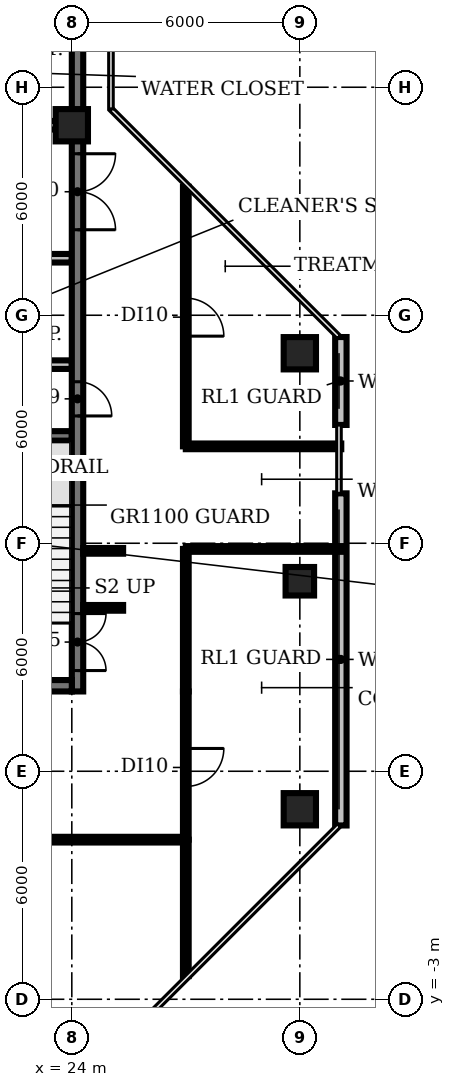
"""IFC4 building model, lengths in metres.
Left out: names, types, materials, properties, quantities, classifications, styles, units other than length and angle.
Written with IfcOpenShell. Run it as: python <this file> out.ifc"""

import sys

from ifc_helpers import new_model, si_unit, direction, frame, frame_2d, origin, origin_2d, place, context, subcontext, project, spatial, rectangle, circle, extrude, element, fill, save


model = new_model("IFC4")
c1 = context("Model", 3, precision=1e-05, world=origin(), true_north=direction((0.0, 1.0)))
c2 = subcontext(c1, "Body", "Model", "MODEL_VIEW")
j1 = project(units=[si_unit("LENGTHUNIT", "METRE"), si_unit("PLANEANGLEUNIT", "RADIAN")], contexts=[c1])
p1 = place(None, origin())
s1 = spatial("IfcSite", under=j1, at=p1, CompositionType="ELEMENT")
p2 = place(p1, origin())
s2 = spatial("IfcBuilding", under=s1, at=p2, CompositionType="ELEMENT")
p3 = place(p2, frame((0.0, 0.0, 276.8)))
s3 = spatial("IfcBuildingStorey", under=s2, at=p3, CompositionType="ELEMENT", Elevation=276.8)
for number, where, z_axis, x_axis in (
    (1, (24.0, 20.0, 0.0), (0.0, 0.0, 1.0), (1.0, 0.0, 0.0)),
    (2, (30.0, 2.0, 0.0), (0.0, 0.0, 1.0), (1.0, 0.0, 0.0)),
):
    element("IfcColumn", number, at=place(p3, frame(where, z_axis=z_axis, x_axis=x_axis)), inside=s3, PredefinedType="COLUMN", context=c2, shape_type="SweptSolid", body=[
        extrude(circle(Radius=0.425, at=origin_2d()), origin(), (0.0, 0.0, 1.0), 3.85),
    ])
p4 = place(p3, frame((30.0, 8.0, 0.0), z_axis=(0.0, 0.0, 1.0), x_axis=(1.0, 0.0, 0.0)))
e3 = element("IfcColumn", 3, at=p4, inside=s3, PredefinedType="COLUMN", context=c2, shape_type="SweptSolid", body=[
    extrude(rectangle(XDim=0.75, YDim=0.75, at=origin_2d()), origin(), (0.0, 0.0, 1.0), 3.85),
])
p5 = place(p3, frame((30.0, 14.0, 0.0), z_axis=(0.0, 0.0, 1.0), x_axis=(1.0, 0.0, 0.0)))
e4 = element("IfcColumn", 4, at=p5, inside=s3, PredefinedType="COLUMN", context=c2, shape_type="SweptSolid", body=[
    extrude(circle(Radius=0.425, at=origin_2d()), origin(), (0.0, 0.0, 1.0), 3.85),
])
p6 = place(p3, frame((31.08, 1.573, 0.0), z_axis=(0.0, 0.0, 1.0), x_axis=(0.0, 1.0, 0.0)))
e5 = element("IfcWall", 5, at=p6, inside=s3, PredefinedType="SOLIDWALL", context=c2, shape_type="SweptSolid", body=[
    extrude(rectangle(XDim=8.74, YDim=0.3, at=frame_2d((4.37, 0.0))), origin(), (0.0, 0.0, 1.0), 3.85),
])
p7 = place(p3, frame((31.08, 12.113, 0.0), z_axis=(0.0, 0.0, 1.0), x_axis=(0.0, 1.0, 0.0)))
e6 = element("IfcWall", 6, at=p7, inside=s3, PredefinedType="SOLIDWALL", context=c2, shape_type="SweptSolid", body=[
    extrude(rectangle(XDim=2.313, YDim=0.3, at=frame_2d((1.157, 0.0))), origin(), (0.0, 0.0, 1.0), 3.85),
])
p8 = place(p3, frame((20.85, 11.825, 0.0), z_axis=(0.0, 0.0, 1.0), x_axis=(1.0, 0.0, 0.0)))
e7 = element("IfcWall", 7, at=p8, inside=s3, PredefinedType="SHEAR", context=c2, shape_type="SweptSolid", body=[
    extrude(rectangle(XDim=3.15, YDim=0.25, at=frame_2d((1.575, 0.0))), origin(), (0.0, 0.0, 1.0), 3.85),
])
p9 = place(p3, frame((16.6, 13.7, 0.0), z_axis=(0.0, 0.0, 1.0), x_axis=(1.0, 0.0, 0.0)))
e8 = element("IfcWall", 8, at=p9, inside=s3, PredefinedType="PARTITIONING", context=c2, shape_type="SweptSolid", body=[
    extrude(rectangle(XDim=7.4, YDim=0.225, at=frame_2d((3.7, 0.0))), origin(), (0.0, 0.0, 1.0), 3.85),
])
p10 = place(p3, frame((9.4, 16.5, 0.0), z_axis=(0.0, 0.0, 1.0), x_axis=(1.0, 0.0, 0.0)))
e9 = element("IfcWall", 9, at=p10, inside=s3, PredefinedType="PARTITIONING", context=c2, shape_type="SweptSolid", body=[
    extrude(rectangle(XDim=14.6, YDim=0.225, at=frame_2d((7.3, 0.0))), origin(), (0.0, 0.0, 1.0), 3.85),
])
p11 = place(p10, frame((1.6, 0.0, 0.0)))
e10 = element("IfcOpeningElement", 10, at=p11, cuts=e9, PredefinedType="OPENING", context=c2, shape_type="SweptSolid", body=[
    extrude(rectangle(XDim=1.0, YDim=2.1, at=frame_2d((0.5, 1.05))), frame((0.0, 0.123, 0.0), z_axis=(0.0, -1.0, 0.0), x_axis=(1.0, 0.0, 0.0)), (0.0, 0.0, 1.0), 0.245),
])
p12 = place(p10, frame((5.125, 0.0, 0.0)))
e11 = element("IfcOpeningElement", 11, at=p12, cuts=e9, PredefinedType="OPENING", context=c2, shape_type="SweptSolid", body=[
    extrude(rectangle(XDim=0.9, YDim=2.1, at=frame_2d((0.45, 1.05))), frame((0.0, 0.123, 0.0), z_axis=(0.0, -1.0, 0.0), x_axis=(1.0, 0.0, 0.0)), (0.0, 0.0, 1.0), 0.245),
])
p13 = place(p10, frame((7.675, 0.0, 0.0)))
e12 = element("IfcOpeningElement", 12, at=p13, cuts=e9, PredefinedType="OPENING", context=c2, shape_type="SweptSolid", body=[
    extrude(rectangle(XDim=0.9, YDim=2.1, at=frame_2d((0.45, 1.05))), frame((0.0, 0.123, 0.0), z_axis=(0.0, -1.0, 0.0), x_axis=(1.0, 0.0, 0.0)), (0.0, 0.0, 1.0), 0.245),
])
p14 = place(p10, frame((9.775, 0.0, 0.0)))
e13 = element("IfcOpeningElement", 13, at=p14, cuts=e9, PredefinedType="OPENING", context=c2, shape_type="SweptSolid", body=[
    extrude(rectangle(XDim=0.9, YDim=2.1, at=frame_2d((0.45, 1.05))), frame((0.0, 0.123, 0.0), z_axis=(0.0, -1.0, 0.0), x_axis=(1.0, 0.0, 0.0)), (0.0, 0.0, 1.0), 0.245),
])
p15 = place(p10, frame((12.4, 0.0, 0.0)))
e14 = element("IfcOpeningElement", 14, at=p15, cuts=e9, PredefinedType="OPENING", context=c2, shape_type="SweptSolid", body=[
    extrude(rectangle(XDim=1.0, YDim=2.1, at=frame_2d((0.5, 1.05))), frame((0.0, 0.123, 0.0), z_axis=(0.0, -1.0, 0.0), x_axis=(1.0, 0.0, 0.0)), (0.0, 0.0, 1.0), 0.245),
])
p16 = place(p3, frame((24.0, 20.0, 0.0), z_axis=(0.0, 0.0, 1.0), x_axis=(-1.0, 0.0, 0.0)))
e15 = element("IfcWall", 15, at=p16, inside=s3, PredefinedType="PARTITIONING", context=c2, shape_type="SweptSolid", body=[
    extrude(rectangle(XDim=14.6, YDim=0.225, at=frame_2d((7.3, 0.0))), origin(), (0.0, 0.0, 1.0), 3.85),
])
p17 = place(p16, frame((12.75, 0.0, 0.0)))
e16 = element("IfcOpeningElement", 16, at=p17, cuts=e15, PredefinedType="OPENING", context=c2, shape_type="SweptSolid", body=[
    extrude(rectangle(XDim=1.1, YDim=2.1, at=frame_2d((0.55, 1.05))), frame((0.0, 0.123, 0.0), z_axis=(0.0, -1.0, 0.0), x_axis=(1.0, 0.0, 0.0)), (0.0, 0.0, 1.0), 0.245),
])
p18 = place(p16, frame((9.95, 0.0, 0.0)))
e17 = element("IfcOpeningElement", 17, at=p18, cuts=e15, PredefinedType="OPENING", context=c2, shape_type="SweptSolid", body=[
    extrude(rectangle(XDim=1.1, YDim=2.1, at=frame_2d((0.55, 1.05))), frame((0.0, 0.123, 0.0), z_axis=(0.0, -1.0, 0.0), x_axis=(1.0, 0.0, 0.0)), (0.0, 0.0, 1.0), 0.245),
])
p19 = place(p16, frame((7.15, 0.0, 0.0)))
e18 = element("IfcOpeningElement", 18, at=p19, cuts=e15, PredefinedType="OPENING", context=c2, shape_type="SweptSolid", body=[
    extrude(rectangle(XDim=1.1, YDim=2.1, at=frame_2d((0.55, 1.05))), frame((0.0, 0.123, 0.0), z_axis=(0.0, -1.0, 0.0), x_axis=(1.0, 0.0, 0.0)), (0.0, 0.0, 1.0), 0.245),
])
p20 = place(p16, frame((4.35, 0.0, 0.0)))
e19 = element("IfcOpeningElement", 19, at=p20, cuts=e15, PredefinedType="OPENING", context=c2, shape_type="SweptSolid", body=[
    extrude(rectangle(XDim=1.1, YDim=2.1, at=frame_2d((0.55, 1.05))), frame((0.0, 0.123, 0.0), z_axis=(0.0, -1.0, 0.0), x_axis=(1.0, 0.0, 0.0)), (0.0, 0.0, 1.0), 0.245),
])
p21 = place(p16, frame((1.2, 0.0, 0.0)))
e20 = element("IfcOpeningElement", 20, at=p21, cuts=e15, PredefinedType="OPENING", context=c2, shape_type="SweptSolid", body=[
    extrude(rectangle(XDim=1.0, YDim=2.1, at=frame_2d((0.5, 1.05))), frame((0.0, 0.123, 0.0), z_axis=(0.0, -1.0, 0.0), x_axis=(1.0, 0.0, 0.0)), (0.0, 0.0, 1.0), 0.245),
])
p22 = place(p3, frame((24.15, 25.655, 0.0), z_axis=(0.0, 0.0, 1.0), x_axis=(0.0, -1.0, 0.0)))
e21 = element("IfcWall", 21, at=p22, inside=s3, PredefinedType="SHEAR", context=c2, shape_type="SweptSolid", body=[
    extrude(rectangle(XDim=20.555, YDim=0.3, at=frame_2d((10.277, 0.0))), origin(), (0.0, 0.0, 1.0), 3.85),
])
p23 = place(p22, frame((18.505, 0.0, 0.0)))
e22 = element("IfcOpeningElement", 22, at=p23, cuts=e21, PredefinedType="OPENING", context=c2, shape_type="SweptSolid", body=[
    extrude(rectangle(XDim=1.5, YDim=2.1, at=frame_2d((0.75, 1.05))), frame((0.0, 0.16, 0.0), z_axis=(0.0, -1.0, 0.0), x_axis=(1.0, 0.0, 0.0)), (0.0, 0.0, 1.0), 0.32),
])
p24 = place(p22, frame((12.405, 0.0, 0.0)))
e23 = element("IfcOpeningElement", 23, at=p24, cuts=e21, PredefinedType="OPENING", context=c2, shape_type="SweptSolid", body=[
    extrude(rectangle(XDim=0.9, YDim=2.1, at=frame_2d((0.45, 1.05))), frame((0.0, 0.16, 0.0), z_axis=(0.0, -1.0, 0.0), x_axis=(1.0, 0.0, 0.0)), (0.0, 0.0, 1.0), 0.32),
])
p25 = place(p22, frame((6.405, 0.0, 0.0)))
e24 = element("IfcOpeningElement", 24, at=p25, cuts=e21, PredefinedType="OPENING", context=c2, shape_type="SweptSolid", body=[
    extrude(rectangle(XDim=2.0, YDim=2.1, at=frame_2d((1.0, 1.05))), frame((0.0, 0.16, 0.0), z_axis=(0.0, -1.0, 0.0), x_axis=(1.0, 0.0, 0.0)), (0.0, 0.0, 1.0), 0.32),
])
p26 = place(p3, frame((24.0, 5.25, 0.0), z_axis=(0.0, 0.0, 1.0), x_axis=(-1.0, 0.0, 0.0)))
e25 = element("IfcWall", 25, at=p26, inside=s3, PredefinedType="SHEAR", context=c2, shape_type="SweptSolid", body=[
    extrude(rectangle(XDim=18.0, YDim=0.3, at=frame_2d((9.0, 0.0))), origin(), (0.0, 0.0, 1.0), 3.85),
])
p27 = place(p26, frame((13.0, 0.0, 0.0)))
e26 = element("IfcOpeningElement", 26, at=p27, cuts=e25, PredefinedType="OPENING", context=c2, shape_type="SweptSolid", body=[
    extrude(rectangle(XDim=1.2, YDim=2.1, at=frame_2d((0.6, 1.05))), frame((0.0, 0.16, 0.0), z_axis=(0.0, -1.0, 0.0), x_axis=(1.0, 0.0, 0.0)), (0.0, 0.0, 1.0), 0.32),
])
p28 = place(p26, frame((4.9, 0.0, 0.0)))
e27 = element("IfcOpeningElement", 27, at=p28, cuts=e25, PredefinedType="OPENING", context=c2, shape_type="SweptSolid", body=[
    extrude(rectangle(XDim=1.0, YDim=2.1, at=frame_2d((0.5, 1.05))), frame((0.0, 0.16, 0.0), z_axis=(0.0, -1.0, 0.0), x_axis=(1.0, 0.0, 0.0)), (0.0, 0.0, 1.0), 0.32),
])
for number, where, z_axis, x_axis in (
    (28, (24.3, 7.3, 0.0), (0.0, 0.0, 1.0), (1.0, 0.0, 0.0)),
    (29, (24.3, 8.8, 0.0), (0.0, 0.0, 1.0), (1.0, 0.0, 0.0)),
):
    element("IfcWall", number, at=place(p3, frame(where, z_axis=z_axis, x_axis=x_axis)), inside=s3, PredefinedType="PARTITIONING", context=c2, shape_type="SweptSolid", body=[
        extrude(rectangle(XDim=1.05, YDim=0.15, at=frame_2d((0.525, 0.0))), origin(), (0.0, 0.0, 1.0), 2.9),
    ])
p29 = place(p3, frame((27.0, -2.39, 0.0), z_axis=(0.0, 0.0, 1.0), x_axis=(0.0, 1.0, 0.0)))
e30 = element("IfcWall", 30, at=p29, inside=s3, PredefinedType="PARTITIONING", context=c2, shape_type="SweptSolid", body=[
    extrude(rectangle(XDim=3.59, YDim=0.15, at=frame_2d((1.795, 0.0))), origin(), (0.0, 0.0, 1.0), 2.9),
])
p30 = place(p3, frame((27.0, 1.2, 0.0), z_axis=(0.0, 0.0, 1.0), x_axis=(-1.0, 0.0, 0.0)))
e31 = element("IfcWall", 31, at=p30, inside=s3, PredefinedType="PARTITIONING", context=c2, shape_type="SweptSolid", body=[
    extrude(rectangle(XDim=24.0, YDim=0.15, at=frame_2d((12.0, 0.0))), origin(), (0.0, 0.0, 1.0), 2.9),
])
p31 = place(p30, frame((11.5, 0.0, 0.0)))
e32 = element("IfcOpeningElement", 32, at=p31, cuts=e31, PredefinedType="OPENING", context=c2, shape_type="SweptSolid", body=[
    extrude(rectangle(XDim=1.2, YDim=2.1, at=frame_2d((0.6, 1.05))), frame((0.0, 0.085, 0.0), z_axis=(0.0, -1.0, 0.0), x_axis=(1.0, 0.0, 0.0)), (0.0, 0.0, 1.0), 0.17),
])
p32 = place(p3, frame((27.0, 5.1, 0.0), z_axis=(0.0, 0.0, 1.0), x_axis=(0.0, -1.0, 0.0)))
e33 = element("IfcWall", 33, at=p32, inside=s3, PredefinedType="PARTITIONING", context=c2, shape_type="SweptSolid", body=[
    extrude(rectangle(XDim=3.9, YDim=0.15, at=frame_2d((1.95, 0.0))), origin(), (0.0, 0.0, 1.0), 2.9),
])
p33 = place(p32, frame((1.5, 0.0, 0.0)))
e34 = element("IfcOpeningElement", 34, at=p33, cuts=e33, PredefinedType="OPENING", context=c2, shape_type="SweptSolid", body=[
    extrude(rectangle(XDim=1.0, YDim=2.1, at=frame_2d((0.5, 1.05))), frame((0.0, 0.085, 0.0), z_axis=(0.0, -1.0, 0.0), x_axis=(1.0, 0.0, 0.0)), (0.0, 0.0, 1.0), 0.17),
])
p34 = place(p3, frame((27.0, 5.1, 0.0), z_axis=(0.0, 0.0, 1.0), x_axis=(0.0, 1.0, 0.0)))
e35 = element("IfcWall", 35, at=p34, inside=s3, PredefinedType="PARTITIONING", context=c2, shape_type="SweptSolid", body=[
    extrude(rectangle(XDim=3.75, YDim=0.15, at=frame_2d((1.875, 0.0))), origin(), (0.0, 0.0, 1.0), 2.9),
])
for number, where, z_axis, x_axis in (
    (36, (27.0, 8.85, 0.0), (0.0, 0.0, 1.0), (1.0, 0.0, 0.0)),
    (37, (27.0, 11.55, 0.0), (0.0, 0.0, 1.0), (1.0, 0.0, 0.0)),
):
    element("IfcWall", number, at=place(p3, frame(where, z_axis=z_axis, x_axis=x_axis)), inside=s3, PredefinedType="PARTITIONING", context=c2, shape_type="SweptSolid", body=[
        extrude(rectangle(XDim=4.09, YDim=0.15, at=frame_2d((2.045, 0.0))), origin(), (0.0, 0.0, 1.0), 2.9),
    ])
p35 = place(p3, frame((27.0, 18.38, 0.0), z_axis=(0.0, 0.0, 1.0), x_axis=(0.0, -1.0, 0.0)))
e38 = element("IfcWall", 38, at=p35, inside=s3, PredefinedType="PARTITIONING", context=c2, shape_type="SweptSolid", body=[
    extrude(rectangle(XDim=6.83, YDim=0.15, at=frame_2d((3.415, 0.0))), origin(), (0.0, 0.0, 1.0), 2.9),
])
p36 = place(p35, frame((2.93, 0.0, 0.0)))
e39 = element("IfcOpeningElement", 39, at=p36, cuts=e38, PredefinedType="OPENING", context=c2, shape_type="SweptSolid", body=[
    extrude(rectangle(XDim=1.0, YDim=2.1, at=frame_2d((0.5, 1.05))), frame((0.0, 0.085, 0.0), z_axis=(0.0, -1.0, 0.0), x_axis=(1.0, 0.0, 0.0)), (0.0, 0.0, 1.0), 0.17),
])
p37 = place(p23, origin())
e40 = element("IfcDoor", 40, at=p37, inside=s3, OperationType="DOUBLE_DOOR_SINGLE_SWING", PredefinedType="DOOR", context=c2, shape_type="SweptSolid", body=[
    extrude(rectangle(XDim=1.5, YDim=2.1, at=frame_2d((0.75, 1.05))), frame((0.0, 0.025, 0.0), z_axis=(0.0, -1.0, 0.0), x_axis=(1.0, 0.0, 0.0)), (0.0, 0.0, 1.0), 0.05),
])
fill(e22, e40)
p38 = place(p24, origin())
e41 = element("IfcDoor", 41, at=p38, inside=s3, OperationType="SINGLE_SWING_RIGHT", PredefinedType="DOOR", context=c2, shape_type="SweptSolid", body=[
    extrude(rectangle(XDim=0.9, YDim=2.1, at=frame_2d((0.45, 1.05))), frame((0.0, 0.025, 0.0), z_axis=(0.0, -1.0, 0.0), x_axis=(1.0, 0.0, 0.0)), (0.0, 0.0, 1.0), 0.05),
])
fill(e23, e41)
p39 = place(p25, origin())
e42 = element("IfcDoor", 42, at=p39, inside=s3, OperationType="DOUBLE_DOOR_SINGLE_SWING", PredefinedType="DOOR", context=c2, shape_type="SweptSolid", body=[
    extrude(rectangle(XDim=2.0, YDim=2.1, at=frame_2d((1.0, 1.05))), frame((0.0, 0.025, 0.0), z_axis=(0.0, -1.0, 0.0), x_axis=(1.0, 0.0, 0.0)), (0.0, 0.0, 1.0), 0.05),
])
fill(e24, e42)
p40 = place(p33, origin())
e43 = element("IfcDoor", 43, at=p40, inside=s3, OperationType="SINGLE_SWING_LEFT", PredefinedType="DOOR", context=c2, shape_type="SweptSolid", body=[
    extrude(rectangle(XDim=1.0, YDim=2.1, at=frame_2d((0.5, 1.05))), frame((0.0, 0.025, 0.0), z_axis=(0.0, -1.0, 0.0), x_axis=(1.0, 0.0, 0.0)), (0.0, 0.0, 1.0), 0.05),
])
fill(e34, e43)
p41 = place(p36, origin())
e44 = element("IfcDoor", 44, at=p41, inside=s3, OperationType="SINGLE_SWING_RIGHT", PredefinedType="DOOR", context=c2, shape_type="SweptSolid", body=[
    extrude(rectangle(XDim=1.0, YDim=2.1, at=frame_2d((0.5, 1.05))), frame((0.0, 0.025, 0.0), z_axis=(0.0, -1.0, 0.0), x_axis=(1.0, 0.0, 0.0)), (0.0, 0.0, 1.0), 0.05),
])
fill(e39, e44)
save(model, sys.argv[1])
